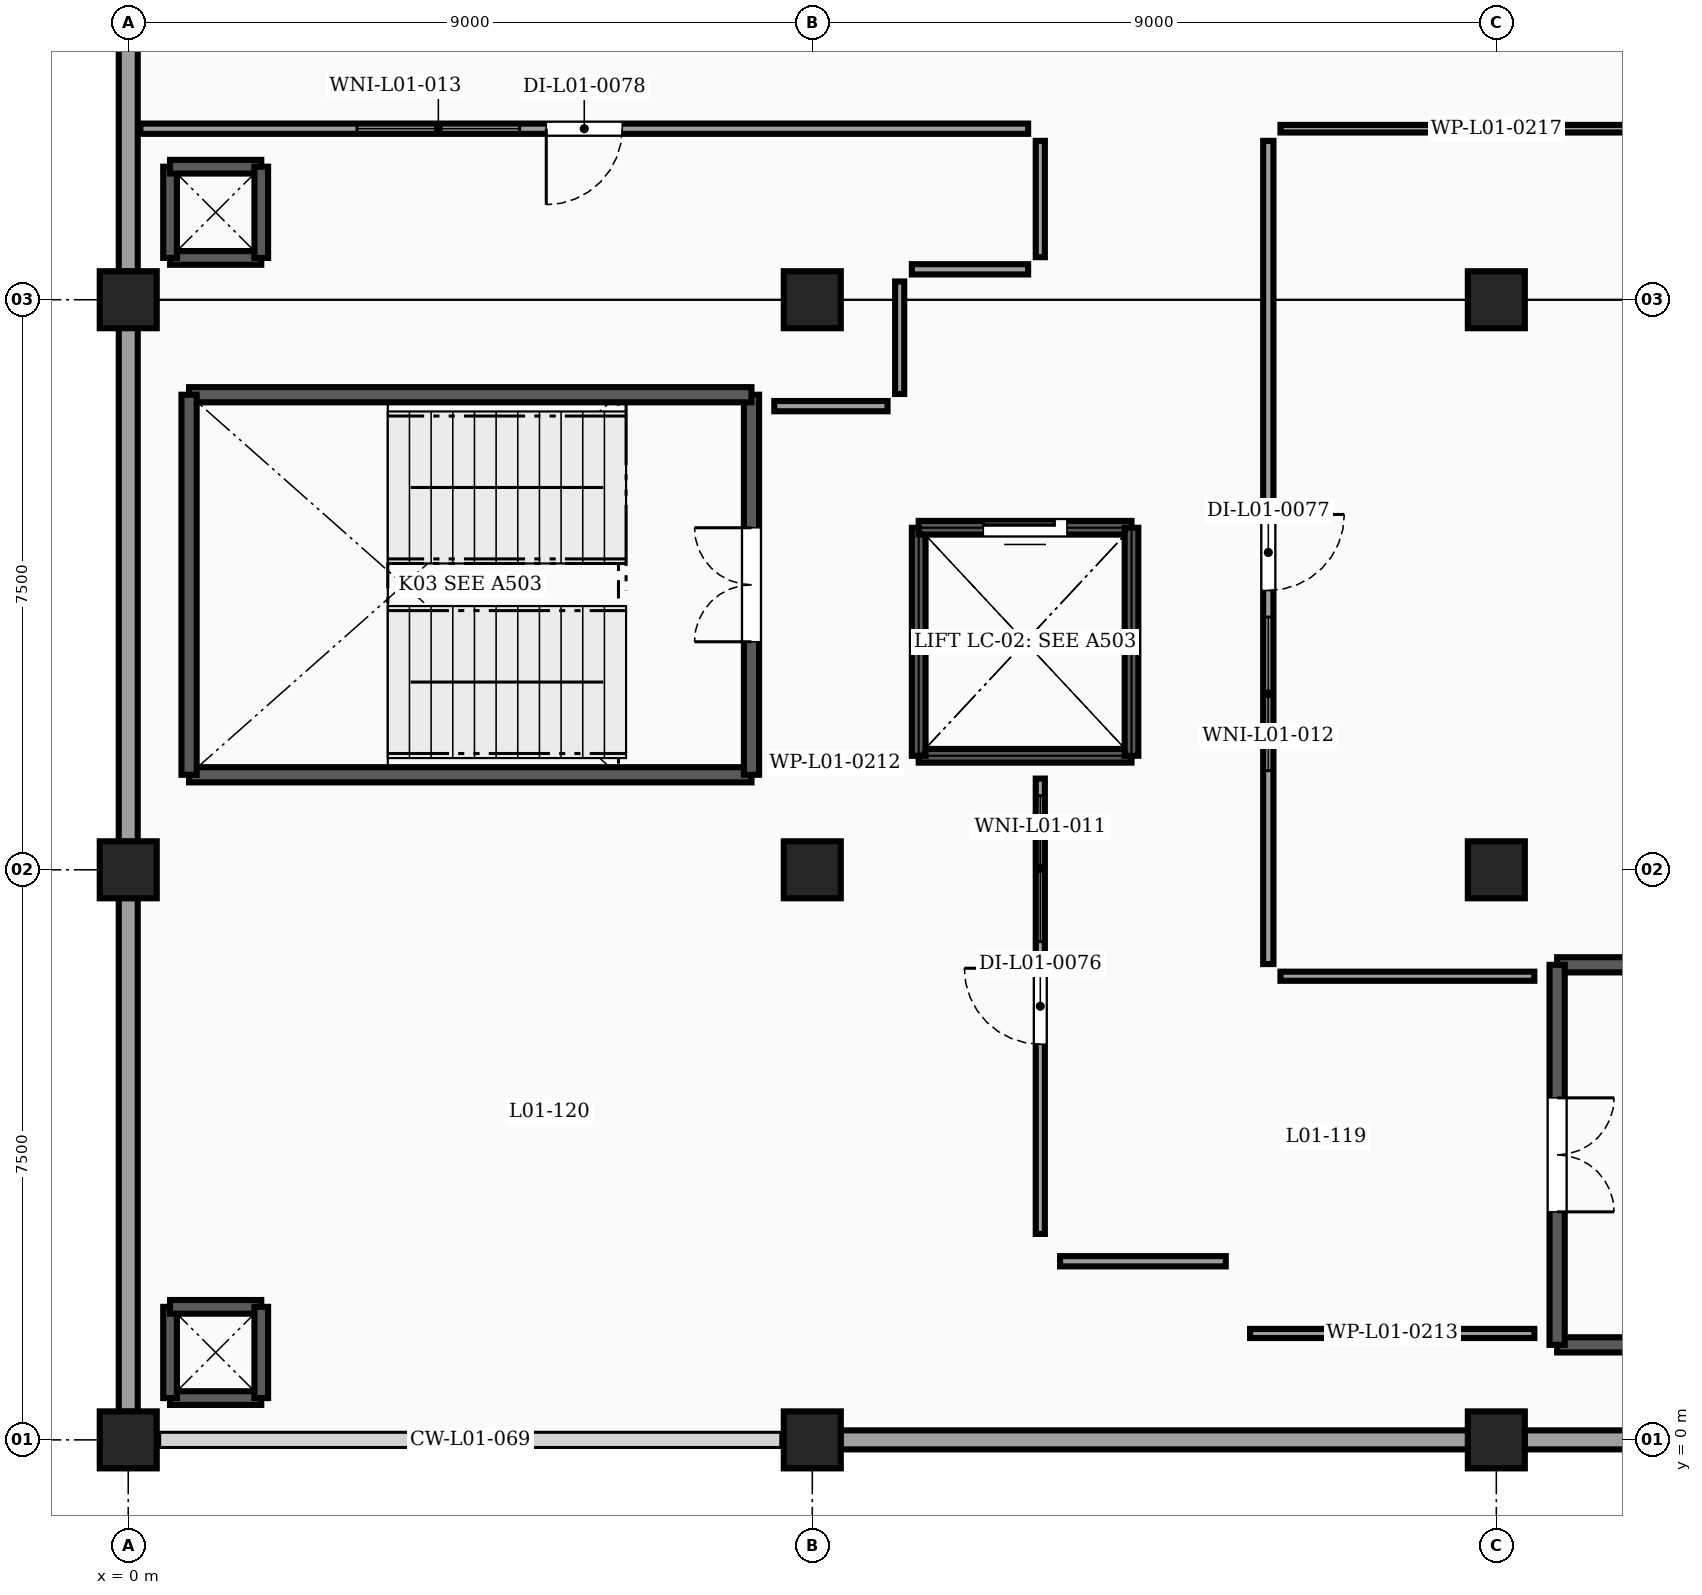
"""IFC4 building model, lengths in metres.
Left out: names, types, materials, properties, quantities, classifications, styles, units other than length and angle.
Written with IfcOpenShell. Run it as: python <this file> out.ifc"""

import sys

from ifc_helpers import new_model, si_unit, direction, frame, frame_2d, origin, origin_2d, place, context, subcontext, project, spatial, rectangle, extrude, element, fill, save


model = new_model("IFC4")
c1 = context("Model", 3, precision=1e-05, world=origin(), true_north=direction((0.0, 1.0)))
c2 = subcontext(c1, "Body", "Model", "MODEL_VIEW")
j1 = project(units=[si_unit("LENGTHUNIT", "METRE"), si_unit("PLANEANGLEUNIT", "RADIAN")], contexts=[c1])
p1 = place(None, origin())
s1 = spatial("IfcSite", under=j1, at=p1, CompositionType="ELEMENT")
p2 = place(p1, origin())
s2 = spatial("IfcBuilding", under=s1, at=p2, CompositionType="ELEMENT")
p3 = place(p2, frame((0.0, 0.0, 4.5)))
s3 = spatial("IfcBuildingStorey", under=s2, at=p3, CompositionType="ELEMENT", Elevation=4.5)
for number, where, z_axis, x_axis in (
    (1, (0.0, 0.0, 0.0), (0.0, 0.0, 1.0), (1.0, 0.0, 0.0)),
    (2, (9.0, 0.0, 0.0), (0.0, 0.0, 1.0), (1.0, 0.0, 0.0)),
    (3, (18.0, 0.0, 0.0), (0.0, 0.0, 1.0), (1.0, 0.0, 0.0)),
    (4, (0.0, 7.5, 0.0), (0.0, 0.0, 1.0), (1.0, 0.0, 0.0)),
    (5, (9.0, 7.5, 0.0), (0.0, 0.0, 1.0), (1.0, 0.0, 0.0)),
    (6, (18.0, 7.5, 0.0), (0.0, 0.0, 1.0), (1.0, 0.0, 0.0)),
    (7, (0.0, 15.0, 0.0), (0.0, 0.0, 1.0), (1.0, 0.0, 0.0)),
    (8, (9.0, 15.0, 0.0), (0.0, 0.0, 1.0), (1.0, 0.0, 0.0)),
    (9, (18.0, 15.0, 0.0), (0.0, 0.0, 1.0), (1.0, 0.0, 0.0)),
):
    element("IfcColumn", number, at=place(p3, frame(where, z_axis=z_axis, x_axis=x_axis)), inside=s3, PredefinedType="COLUMN", context=c2, shape_type="SweptSolid", body=[
        extrude(rectangle(XDim=0.75, YDim=0.75, at=origin_2d()), origin(), (0.0, 0.0, 1.0), 4.0),
    ])
for number, where, z_axis, x_axis in (
    (10, (26.629, 0.0, 0.0), (0.0, 0.0, 1.0), (-1.0, 0.0, 0.0)),
    (11, (17.629, 0.0, 0.0), (0.0, 0.0, 1.0), (-1.0, 0.0, 0.0)),
):
    element("IfcWall", number, at=place(p3, frame(where, z_axis=z_axis, x_axis=x_axis)), inside=s3, PredefinedType="SOLIDWALL", context=c2, shape_type="SweptSolid", body=[
        extrude(rectangle(XDim=8.258, YDim=0.25, at=frame_2d((4.129, 0.0))), origin(), (0.0, 0.0, 1.0), 3.41),
    ])
for number, where, z_axis, x_axis in (
    (12, (0.0, 0.371, 0.0), (0.0, 0.0, 1.0), (0.0, 1.0, 0.0)),
    (13, (0.0, 7.871, 0.0), (0.0, 0.0, 1.0), (0.0, 1.0, 0.0)),
    (14, (0.0, 15.371, 0.0), (0.0, 0.0, 1.0), (0.0, 1.0, 0.0)),
):
    element("IfcWall", number, at=place(p3, frame(where, z_axis=z_axis, x_axis=x_axis)), inside=s3, PredefinedType="SOLIDWALL", context=c2, shape_type="SweptSolid", body=[
        extrude(rectangle(XDim=6.758, YDim=0.25, at=frame_2d((3.379, 0.0))), origin(), (0.0, 0.0, 1.0), 3.41),
    ])
for number, where, z_axis, x_axis in (
    (15, (1.75, 0.55, 0.0), (0.0, 0.0, 1.0), (-1.0, 0.0, 0.0)),
    (16, (0.55, 0.55, 0.0), (0.0, 0.0, 1.0), (0.0, 1.0, 0.0)),
    (17, (0.55, 1.75, 0.0), (0.0, 0.0, 1.0), (1.0, 0.0, 0.0)),
    (18, (1.75, 1.75, 0.0), (0.0, 0.0, 1.0), (0.0, -1.0, 0.0)),
    (19, (1.75, 15.55, 0.0), (0.0, 0.0, 1.0), (-1.0, 0.0, 0.0)),
    (20, (0.55, 15.55, 0.0), (0.0, 0.0, 1.0), (0.0, 1.0, 0.0)),
    (21, (0.55, 16.75, 0.0), (0.0, 0.0, 1.0), (1.0, 0.0, 0.0)),
    (22, (1.75, 16.75, 0.0), (0.0, 0.0, 1.0), (0.0, -1.0, 0.0)),
):
    element("IfcWall", number, at=place(p3, frame(where, z_axis=z_axis, x_axis=x_axis)), inside=s3, PredefinedType="SHEAR", context=c2, shape_type="SweptSolid", body=[
        extrude(rectangle(XDim=1.2, YDim=0.18, at=frame_2d((0.6, 0.0))), origin(), (0.0, 0.0, 1.0), 3.77),
    ])
p4 = place(p3, frame((0.8, 8.75, 0.0), z_axis=(0.0, 0.0, 1.0), x_axis=(1.0, 0.0, 0.0)))
e23 = element("IfcWall", 23, at=p4, inside=s3, PredefinedType="SHEAR", context=c2, shape_type="SweptSolid", body=[
    extrude(rectangle(XDim=7.4, YDim=0.2, at=frame_2d((3.7, 0.0))), origin(), (0.0, 0.0, 1.0), 3.77),
])
p5 = place(p3, frame((8.2, 8.75, 0.0), z_axis=(0.0, 0.0, 1.0), x_axis=(0.0, 1.0, 0.0)))
e24 = element("IfcWall", 24, at=p5, inside=s3, PredefinedType="SHEAR", context=c2, shape_type="SweptSolid", body=[
    extrude(rectangle(XDim=5.0, YDim=0.2, at=frame_2d((2.5, 0.0))), origin(), (0.0, 0.0, 1.0), 3.77),
])
p6 = place(p5, frame((1.75, 0.0, 0.0)))
e25 = element("IfcOpeningElement", 25, at=p6, cuts=e24, PredefinedType="OPENING", context=c2, shape_type="SweptSolid", body=[
    extrude(rectangle(XDim=1.5, YDim=2.15, at=frame_2d((0.75, 1.075))), frame((0.0, 0.11, 0.0), z_axis=(0.0, -1.0, 0.0), x_axis=(1.0, 0.0, 0.0)), (0.0, 0.0, 1.0), 0.22),
])
p7 = place(p3, frame((8.2, 13.75, 0.0), z_axis=(0.0, 0.0, 1.0), x_axis=(-1.0, 0.0, 0.0)))
e26 = element("IfcWall", 26, at=p7, inside=s3, PredefinedType="SHEAR", context=c2, shape_type="SweptSolid", body=[
    extrude(rectangle(XDim=7.4, YDim=0.2, at=frame_2d((3.7, 0.0))), origin(), (0.0, 0.0, 1.0), 3.77),
])
p8 = place(p3, frame((0.8, 13.75, 0.0), z_axis=(0.0, 0.0, 1.0), x_axis=(0.0, -1.0, 0.0)))
e27 = element("IfcWall", 27, at=p8, inside=s3, PredefinedType="SHEAR", context=c2, shape_type="SweptSolid", body=[
    extrude(rectangle(XDim=5.0, YDim=0.2, at=frame_2d((2.5, 0.0))), origin(), (0.0, 0.0, 1.0), 3.77),
])
for number, where, z_axis, x_axis in (
    (28, (18.8, 1.25, 0.0), (0.0, 0.0, 1.0), (1.0, 0.0, 0.0)),
    (29, (26.2, 6.25, 0.0), (0.0, 0.0, 1.0), (-1.0, 0.0, 0.0)),
):
    element("IfcWall", number, at=place(p3, frame(where, z_axis=z_axis, x_axis=x_axis)), inside=s3, PredefinedType="SHEAR", context=c2, shape_type="SweptSolid", body=[
        extrude(rectangle(XDim=7.4, YDim=0.2, at=frame_2d((3.7, 0.0))), origin(), (0.0, 0.0, 1.0), 3.77),
    ])
p9 = place(p3, frame((18.8, 6.25, 0.0), z_axis=(0.0, 0.0, 1.0), x_axis=(0.0, -1.0, 0.0)))
e30 = element("IfcWall", 30, at=p9, inside=s3, PredefinedType="SHEAR", context=c2, shape_type="SweptSolid", body=[
    extrude(rectangle(XDim=5.0, YDim=0.2, at=frame_2d((2.5, 0.0))), origin(), (0.0, 0.0, 1.0), 3.77),
])
p10 = place(p9, frame((1.75, 0.0, 0.0)))
e31 = element("IfcOpeningElement", 31, at=p10, cuts=e30, PredefinedType="OPENING", context=c2, shape_type="SweptSolid", body=[
    extrude(rectangle(XDim=1.5, YDim=2.15, at=frame_2d((0.75, 1.075))), frame((0.0, 0.11, 0.0), z_axis=(0.0, -1.0, 0.0), x_axis=(1.0, 0.0, 0.0)), (0.0, 0.0, 1.0), 0.22),
])
p11 = place(p3, frame((13.2, 9.0, 0.0), z_axis=(0.0, 0.0, 1.0), x_axis=(-1.0, 0.0, 0.0)))
e32 = element("IfcWall", 32, at=p11, inside=s3, PredefinedType="SHEAR", context=c2, shape_type="SweptSolid", body=[
    extrude(rectangle(XDim=2.8, YDim=0.18, at=frame_2d((1.4, 0.0))), origin(), (0.0, 0.0, 1.0), 3.77),
])
p12 = place(p3, frame((10.4, 9.0, 0.0), z_axis=(0.0, 0.0, 1.0), x_axis=(0.0, 1.0, 0.0)))
e33 = element("IfcWall", 33, at=p12, inside=s3, PredefinedType="SHEAR", context=c2, shape_type="SweptSolid", body=[
    extrude(rectangle(XDim=3.0, YDim=0.18, at=frame_2d((1.5, 0.0))), origin(), (0.0, 0.0, 1.0), 3.77),
])
p13 = place(p3, frame((10.4, 12.0, 0.0), z_axis=(0.0, 0.0, 1.0), x_axis=(1.0, 0.0, 0.0)))
e34 = element("IfcWall", 34, at=p13, inside=s3, PredefinedType="SHEAR", context=c2, shape_type="SweptSolid", body=[
    extrude(rectangle(XDim=2.8, YDim=0.18, at=frame_2d((1.4, 0.0))), origin(), (0.0, 0.0, 1.0), 3.77),
])
p14 = place(p13, frame((0.85, 0.0, 0.0)))
e35 = element("IfcOpeningElement", 35, at=p14, cuts=e34, PredefinedType="OPENING", context=c2, shape_type="SweptSolid", body=[
    extrude(rectangle(XDim=1.1, YDim=2.15, at=frame_2d((0.55, 1.075))), frame((0.0, 0.1, 0.0), z_axis=(0.0, -1.0, 0.0), x_axis=(1.0, 0.0, 0.0)), (0.0, 0.0, 1.0), 0.2),
])
p15 = place(p3, frame((13.2, 12.0, 0.0), z_axis=(0.0, 0.0, 1.0), x_axis=(0.0, -1.0, 0.0)))
e36 = element("IfcWall", 36, at=p15, inside=s3, PredefinedType="SHEAR", context=c2, shape_type="SweptSolid", body=[
    extrude(rectangle(XDim=3.0, YDim=0.18, at=frame_2d((1.5, 0.0))), origin(), (0.0, 0.0, 1.0), 3.77),
])
p16 = place(p3, frame((10.1, 8.9, 0.0), z_axis=(0.0, 0.0, 1.0), x_axis=(-1.0, 0.0, 0.0)))
e37 = element("IfcWall", 37, at=p16, inside=s3, PredefinedType="PARTITIONING", context=c2, shape_type="SweptSolid", body=[
    extrude(rectangle(XDim=1.6, YDim=0.135, at=frame_2d((0.8, 0.0))), origin(), (0.0, 0.0, 1.0), 3.77),
])
p17 = place(p3, frame((18.5, 1.4, 0.0), z_axis=(0.0, 0.0, 1.0), x_axis=(-1.0, 0.0, 0.0)))
e38 = element("IfcWall", 38, at=p17, inside=s3, PredefinedType="PARTITIONING", context=c2, shape_type="SweptSolid", body=[
    extrude(rectangle(XDim=3.74, YDim=0.12, at=frame_2d((1.87, 0.0))), origin(), (0.0, 0.0, 1.0), 3.77),
])
p18 = place(p3, frame((14.44, 2.35, 0.0), z_axis=(0.0, 0.0, 1.0), x_axis=(-1.0, 0.0, 0.0)))
e39 = element("IfcWall", 39, at=p18, inside=s3, PredefinedType="PARTITIONING", context=c2, shape_type="SweptSolid", body=[
    extrude(rectangle(XDim=2.18, YDim=0.135, at=frame_2d((1.09, 0.0))), origin(), (0.0, 0.0, 1.0), 3.77),
])
p19 = place(p3, frame((12.0, 2.71, 0.0), z_axis=(0.0, 0.0, 1.0), x_axis=(0.0, 1.0, 0.0)))
e40 = element("IfcWall", 40, at=p19, inside=s3, PredefinedType="PARTITIONING", context=c2, shape_type="SweptSolid", body=[
    extrude(rectangle(XDim=5.99, YDim=0.12, at=frame_2d((2.995, 0.0))), origin(), (0.0, 0.0, 1.0), 3.362),
])
p20 = place(p19, frame((2.495, 0.0, 0.0)))
e41 = element("IfcOpeningElement", 41, at=p20, cuts=e40, PredefinedType="OPENING", context=c2, shape_type="SweptSolid", body=[
    extrude(rectangle(XDim=1.0, YDim=2.15, at=frame_2d((0.5, 1.075))), frame((0.0, 0.07, 0.0), z_axis=(0.0, -1.0, 0.0), x_axis=(1.0, 0.0, 0.0)), (0.0, 0.0, 1.0), 0.14),
])
p21 = place(p19, frame((3.845, 0.0, 1.02)))
e42 = element("IfcOpeningElement", 42, at=p21, cuts=e40, PredefinedType="OPENING", context=c2, shape_type="SweptSolid", body=[
    extrude(rectangle(XDim=1.92, YDim=1.24, at=frame_2d((0.96, 0.62))), frame((0.0, 0.07, 0.0), z_axis=(0.0, -1.0, 0.0), x_axis=(1.0, 0.0, 0.0)), (0.0, 0.0, 1.0), 0.14),
])
p22 = place(p3, frame((20.84, 17.25, 0.0), z_axis=(0.0, 0.0, 1.0), x_axis=(-1.0, 0.0, 0.0)))
e43 = element("IfcWall", 43, at=p22, inside=s3, PredefinedType="PARTITIONING", context=c2, shape_type="SweptSolid", body=[
    extrude(rectangle(XDim=5.68, YDim=0.1, at=frame_2d((2.84, 0.0))), origin(), (0.0, 0.0, 1.0), 3.77),
])
p23 = place(p3, frame((15.0, 17.09, 0.0), z_axis=(0.0, 0.0, 1.0), x_axis=(0.0, -1.0, 0.0)))
e44 = element("IfcWall", 44, at=p23, inside=s3, PredefinedType="PARTITIONING", context=c2, shape_type="SweptSolid", body=[
    extrude(rectangle(XDim=10.83, YDim=0.135, at=frame_2d((5.415, 0.0))), origin(), (0.0, 0.0, 1.0), 3.362),
])
p24 = place(p23, frame((4.915, 0.0, 0.0)))
e45 = element("IfcOpeningElement", 45, at=p24, cuts=e44, PredefinedType="OPENING", context=c2, shape_type="SweptSolid", body=[
    extrude(rectangle(XDim=1.0, YDim=2.15, at=frame_2d((0.5, 1.075))), frame((0.0, 0.077, 0.0), z_axis=(0.0, -1.0, 0.0), x_axis=(1.0, 0.0, 0.0)), (0.0, 0.0, 1.0), 0.155),
])
p25 = place(p23, frame((6.265, 0.0, 1.02)))
e46 = element("IfcOpeningElement", 46, at=p25, cuts=e44, PredefinedType="OPENING", context=c2, shape_type="SweptSolid", body=[
    extrude(rectangle(XDim=2.02, YDim=1.24, at=frame_2d((1.01, 0.62))), frame((0.0, 0.077, 0.0), z_axis=(0.0, -1.0, 0.0), x_axis=(1.0, 0.0, 0.0)), (0.0, 0.0, 1.0), 0.155),
])
p26 = place(p3, frame((15.16, 6.1, 0.0), z_axis=(0.0, 0.0, 1.0), x_axis=(1.0, 0.0, 0.0)))
e47 = element("IfcWall", 47, at=p26, inside=s3, PredefinedType="PARTITIONING", context=c2, shape_type="SweptSolid", body=[
    extrude(rectangle(XDim=3.34, YDim=0.12, at=frame_2d((1.67, 0.0))), origin(), (0.0, 0.0, 1.0), 3.77),
])
p27 = place(p3, frame((8.5, 13.6, 0.0), z_axis=(0.0, 0.0, 1.0), x_axis=(1.0, 0.0, 0.0)))
e48 = element("IfcWall", 48, at=p27, inside=s3, PredefinedType="PARTITIONING", context=c2, shape_type="SweptSolid", body=[
    extrude(rectangle(XDim=1.49, YDim=0.135, at=frame_2d((0.745, 0.0))), origin(), (0.0, 0.0, 1.0), 3.77),
])
p28 = place(p3, frame((10.15, 13.76, 0.0), z_axis=(0.0, 0.0, 1.0), x_axis=(0.0, 1.0, 0.0)))
e49 = element("IfcWall", 49, at=p28, inside=s3, PredefinedType="PARTITIONING", context=c2, shape_type="SweptSolid", body=[
    extrude(rectangle(XDim=1.48, YDim=0.12, at=frame_2d((0.74, 0.0))), origin(), (0.0, 0.0, 1.0), 3.77),
])
p29 = place(p3, frame((10.31, 15.4, 0.0), z_axis=(0.0, 0.0, 1.0), x_axis=(1.0, 0.0, 0.0)))
e50 = element("IfcWall", 50, at=p29, inside=s3, PredefinedType="PARTITIONING", context=c2, shape_type="SweptSolid", body=[
    extrude(rectangle(XDim=1.53, YDim=0.135, at=frame_2d((0.765, 0.0))), origin(), (0.0, 0.0, 1.0), 2.772),
])
p30 = place(p3, frame((12.0, 15.56, 0.0), z_axis=(0.0, 0.0, 1.0), x_axis=(0.0, 1.0, 0.0)))
e51 = element("IfcWall", 51, at=p30, inside=s3, PredefinedType="PARTITIONING", context=c2, shape_type="SweptSolid", body=[
    extrude(rectangle(XDim=1.53, YDim=0.12, at=frame_2d((0.765, 0.0))), origin(), (0.0, 0.0, 1.0), 3.362),
])
p31 = place(p3, frame((11.84, 17.25, 0.0), z_axis=(0.0, 0.0, 1.0), x_axis=(-1.0, 0.0, 0.0)))
e52 = element("IfcWall", 52, at=p31, inside=s3, PredefinedType="PARTITIONING", context=c2, shape_type="SweptSolid", body=[
    extrude(rectangle(XDim=11.68, YDim=0.135, at=frame_2d((5.84, 0.0))), origin(), (0.0, 0.0, 1.0), 3.77),
])
p32 = place(p31, frame((5.34, 0.0, 0.0)))
e53 = element("IfcOpeningElement", 53, at=p32, cuts=e52, PredefinedType="OPENING", context=c2, shape_type="SweptSolid", body=[
    extrude(rectangle(XDim=1.0, YDim=2.15, at=frame_2d((0.5, 1.075))), frame((0.0, 0.077, 0.0), z_axis=(0.0, -1.0, 0.0), x_axis=(1.0, 0.0, 0.0)), (0.0, 0.0, 1.0), 0.155),
])
p33 = place(p31, frame((6.69, 0.0, 1.02)))
e54 = element("IfcOpeningElement", 54, at=p33, cuts=e52, PredefinedType="OPENING", context=c2, shape_type="SweptSolid", body=[
    extrude(rectangle(XDim=2.14, YDim=1.22, at=frame_2d((1.07, 0.61))), frame((0.0, 0.077, 0.0), z_axis=(0.0, -1.0, 0.0), x_axis=(1.0, 0.0, 0.0)), (0.0, 0.0, 1.0), 0.155),
])
p34 = place(p6, origin())
e55 = element("IfcDoor", 55, at=p34, inside=s3, OperationType="DOUBLE_DOOR_SINGLE_SWING", PredefinedType="DOOR", context=c2, shape_type="SweptSolid", body=[
    extrude(rectangle(XDim=1.5, YDim=2.15, at=frame_2d((0.75, 1.075))), frame((0.0, 0.025, 0.0), z_axis=(0.0, -1.0, 0.0), x_axis=(1.0, 0.0, 0.0)), (0.0, 0.0, 1.0), 0.05),
])
fill(e25, e55)
p35 = place(p10, origin())
e56 = element("IfcDoor", 56, at=p35, inside=s3, OperationType="DOUBLE_DOOR_SINGLE_SWING", PredefinedType="DOOR", context=c2, shape_type="SweptSolid", body=[
    extrude(rectangle(XDim=1.5, YDim=2.15, at=frame_2d((0.75, 1.075))), frame((0.0, 0.025, 0.0), z_axis=(0.0, -1.0, 0.0), x_axis=(1.0, 0.0, 0.0)), (0.0, 0.0, 1.0), 0.05),
])
fill(e31, e56)
p36 = place(p14, origin())
e57 = element("IfcDoor", 57, at=p36, inside=s3, OperationType="SLIDING_TO_LEFT", PredefinedType="DOOR", context=c2, shape_type="SweptSolid", body=[
    extrude(rectangle(XDim=1.1, YDim=2.15, at=frame_2d((0.55, 1.075))), frame((0.0, 0.025, 0.0), z_axis=(0.0, -1.0, 0.0), x_axis=(1.0, 0.0, 0.0)), (0.0, 0.0, 1.0), 0.05),
])
fill(e35, e57)
p37 = place(p20, origin())
e58 = element("IfcDoor", 58, at=p37, inside=s3, OperationType="SINGLE_SWING_RIGHT", PredefinedType="DOOR", context=c2, shape_type="SweptSolid", body=[
    extrude(rectangle(XDim=1.0, YDim=2.15, at=frame_2d((0.5, 1.075))), frame((0.0, 0.025, 0.0), z_axis=(0.0, -1.0, 0.0), x_axis=(1.0, 0.0, 0.0)), (0.0, 0.0, 1.0), 0.05),
])
fill(e41, e58)
p38 = place(p21, origin())
e59 = element("IfcWindow", 59, at=p38, inside=s3, PartitioningType="DOUBLE_PANEL_VERTICAL", PredefinedType="WINDOW", context=c2, shape_type="SweptSolid", body=[
    extrude(rectangle(XDim=1.92, YDim=1.24, at=frame_2d((0.96, 0.62))), frame((0.0, 0.03, 0.0), z_axis=(0.0, -1.0, 0.0), x_axis=(1.0, 0.0, 0.0)), (0.0, 0.0, 1.0), 0.06),
])
fill(e42, e59)
p39 = place(p24, origin())
e60 = element("IfcDoor", 60, at=p39, inside=s3, OperationType="SINGLE_SWING_LEFT", PredefinedType="DOOR", context=c2, shape_type="SweptSolid", body=[
    extrude(rectangle(XDim=1.0, YDim=2.15, at=frame_2d((0.5, 1.075))), frame((0.0, 0.025, 0.0), z_axis=(0.0, -1.0, 0.0), x_axis=(1.0, 0.0, 0.0)), (0.0, 0.0, 1.0), 0.05),
])
fill(e45, e60)
p40 = place(p25, origin())
e61 = element("IfcWindow", 61, at=p40, inside=s3, PartitioningType="DOUBLE_PANEL_VERTICAL", PredefinedType="WINDOW", context=c2, shape_type="SweptSolid", body=[
    extrude(rectangle(XDim=2.02, YDim=1.24, at=frame_2d((1.01, 0.62))), frame((0.0, 0.03, 0.0), z_axis=(0.0, -1.0, 0.0), x_axis=(1.0, 0.0, 0.0)), (0.0, 0.0, 1.0), 0.06),
])
fill(e46, e61)
p41 = place(p32, origin())
e62 = element("IfcDoor", 62, at=p41, inside=s3, OperationType="SINGLE_SWING_RIGHT", PredefinedType="DOOR", context=c2, shape_type="SweptSolid", body=[
    extrude(rectangle(XDim=1.0, YDim=2.15, at=frame_2d((0.5, 1.075))), frame((0.0, 0.025, 0.0), z_axis=(0.0, -1.0, 0.0), x_axis=(1.0, 0.0, 0.0)), (0.0, 0.0, 1.0), 0.05),
])
fill(e53, e62)
p42 = place(p33, origin())
e63 = element("IfcWindow", 63, at=p42, inside=s3, PartitioningType="DOUBLE_PANEL_VERTICAL", PredefinedType="WINDOW", context=c2, shape_type="SweptSolid", body=[
    extrude(rectangle(XDim=2.14, YDim=1.22, at=frame_2d((1.07, 0.61))), frame((0.0, 0.03, 0.0), z_axis=(0.0, -1.0, 0.0), x_axis=(1.0, 0.0, 0.0)), (0.0, 0.0, 1.0), 0.06),
])
fill(e54, e63)
save(model, sys.argv[1])
